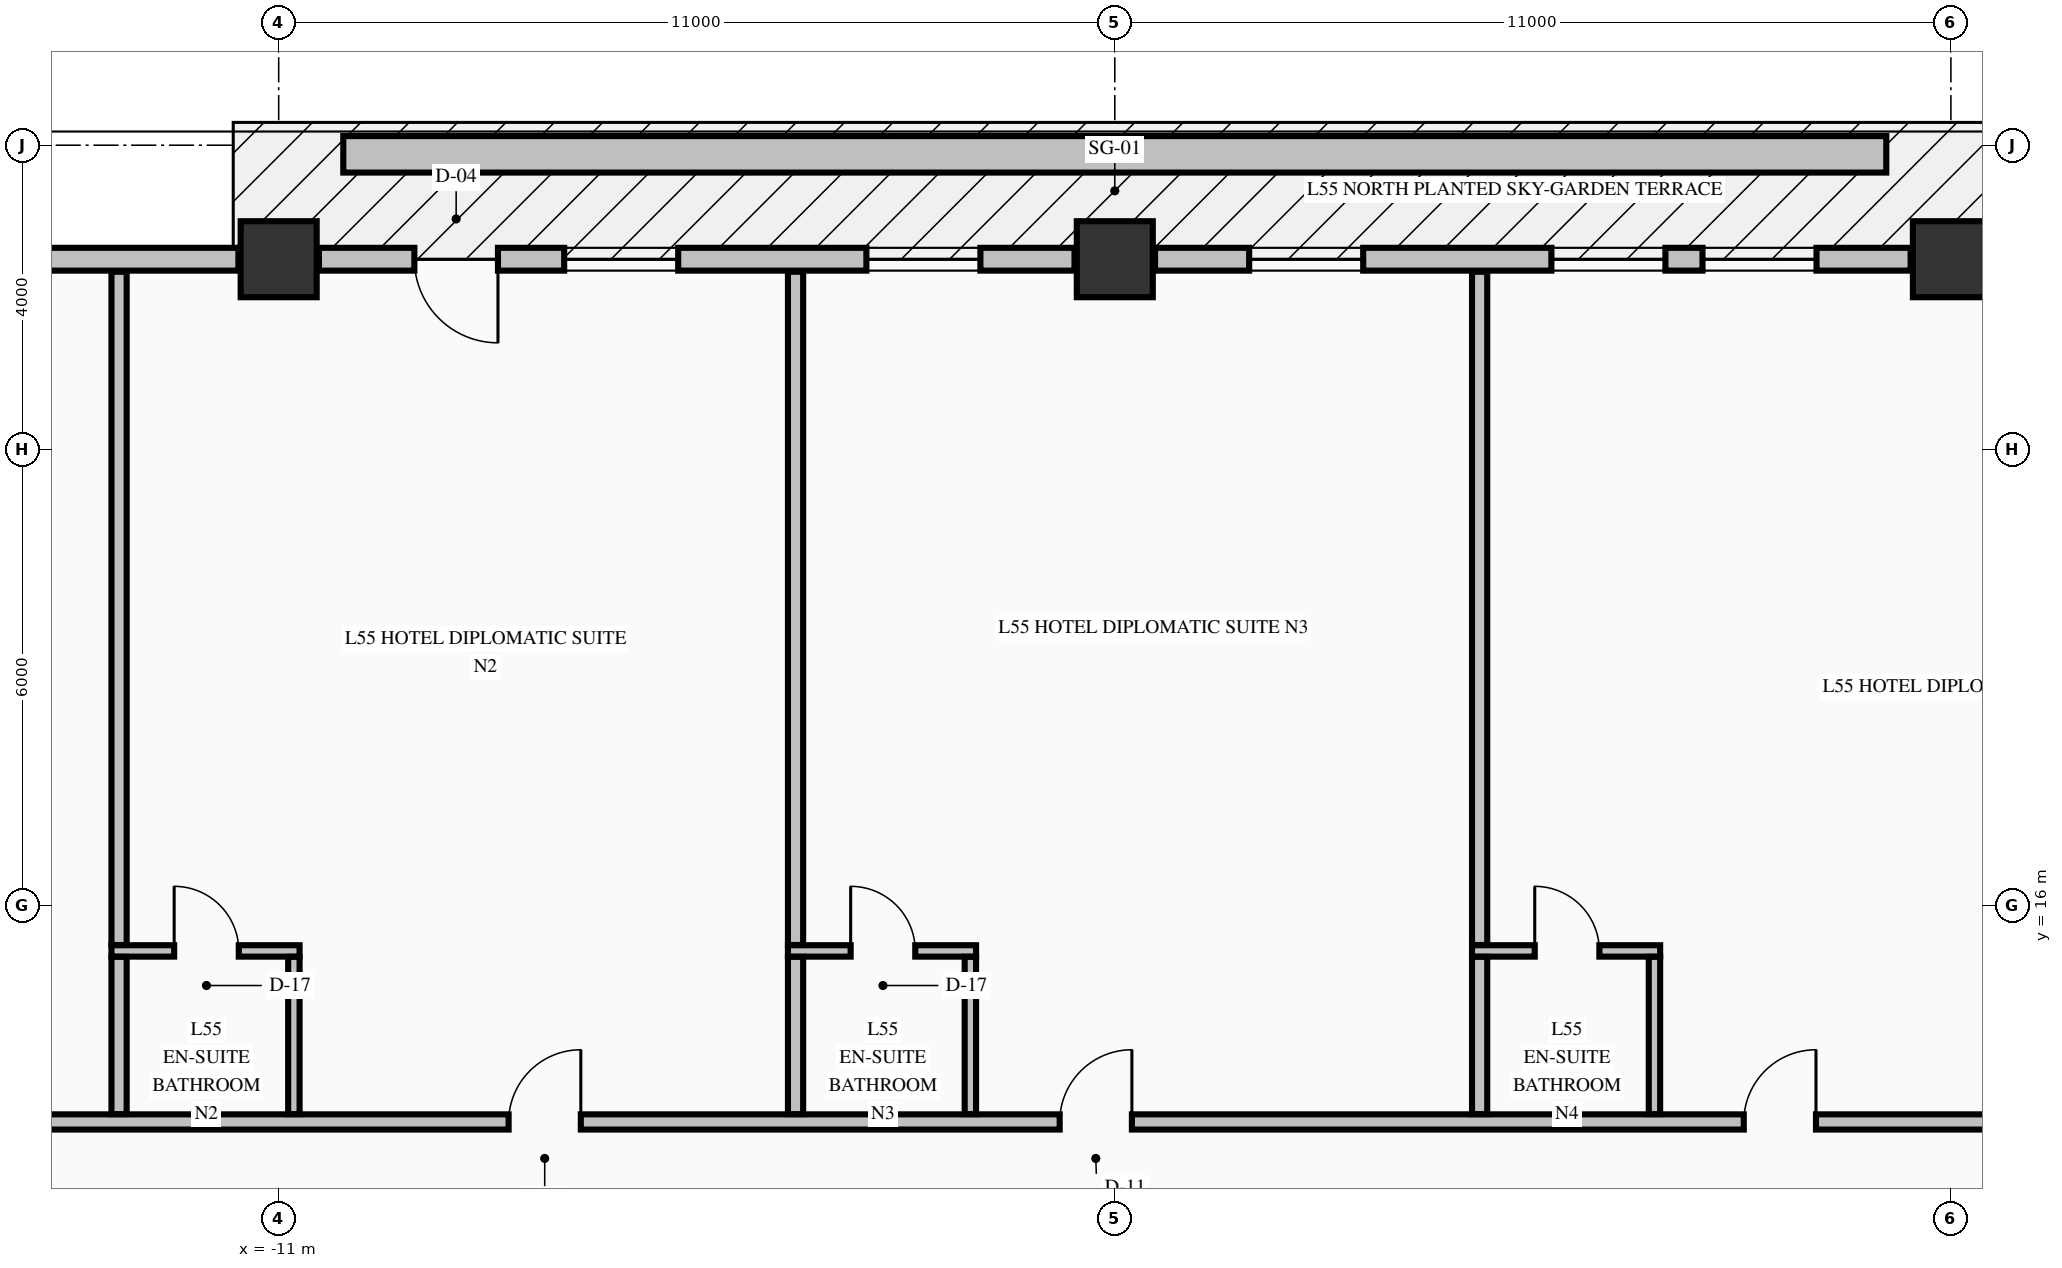
"""IFC4 building model, lengths in metres.
Left out: names, types, materials, properties, quantities, classifications, styles, units other than length and angle.
Written with IfcOpenShell. Run it as: python <this file> out.ifc"""

import sys

from ifc_helpers import new_model, si_unit, direction, frame, frame_2d, origin, origin_2d, place, context, subcontext, project, spatial, rectangle, extrude, element, fill, save


model = new_model("IFC4")
c1 = context("Model", 3, precision=1e-05, world=origin(), true_north=direction((0.0, 1.0)))
c2 = subcontext(c1, "Body", "Model", "MODEL_VIEW")
j1 = project(units=[si_unit("LENGTHUNIT", "METRE"), si_unit("PLANEANGLEUNIT", "RADIAN")], contexts=[c1])
p1 = place(None, origin())
s1 = spatial("IfcSite", under=j1, at=p1, CompositionType="ELEMENT")
p2 = place(p1, origin())
s2 = spatial("IfcBuilding", under=s1, at=p2, CompositionType="ELEMENT")
p3 = place(p2, frame((0.0, 0.0, 211.86)))
s3 = spatial("IfcBuildingStorey", under=s2, at=p3, CompositionType="ELEMENT", Elevation=211.86)
for number, where, z_axis, x_axis in (
    (1, (-11.0, 24.5, -0.325), (0.0, 0.0, 1.0), (1.0, 0.0, 0.0)),
    (2, (0.0, 24.5, -0.325), (0.0, 0.0, 1.0), (1.0, 0.0, 0.0)),
    (3, (11.0, 24.5, -0.325), (0.0, 0.0, 1.0), (1.0, 0.0, 0.0)),
):
    element("IfcColumn", number, at=place(p3, frame(where, z_axis=z_axis, x_axis=x_axis)), inside=s3, PredefinedType="COLUMN", context=c2, shape_type="SweptSolid", body=[
        extrude(rectangle(XDim=1.0, YDim=1.0, at=origin_2d()), origin(), (0.0, 0.0, 1.0), 3.475),
    ])
p4 = place(p3, frame((-11.53, 24.5, 0.0), z_axis=(0.0, 0.0, 1.0), x_axis=(-1.0, 0.0, 0.0)))
e4 = element("IfcWall", 4, at=p4, inside=s3, PredefinedType="STANDARD", context=c2, shape_type="SweptSolid", body=[
    extrude(rectangle(XDim=9.94, YDim=0.3, at=frame_2d((4.97, 0.0))), origin(), (0.0, 0.0, 1.0), 2.542),
])
p5 = place(p4, frame((3.226, 0.0, 0.72)))
e5 = element("IfcOpeningElement", 5, at=p5, cuts=e4, PredefinedType="OPENING", context=c2, shape_type="SweptSolid", body=[
    extrude(rectangle(XDim=1.5, YDim=1.6, at=frame_2d((0.75, 0.8))), frame((0.0, 0.16, 0.0), z_axis=(0.0, -1.0, 0.0), x_axis=(1.0, 0.0, 0.0)), (0.0, 0.0, 1.0), 0.32),
])
p6 = place(p4, frame((5.214, 0.0, 0.72)))
e6 = element("IfcOpeningElement", 6, at=p6, cuts=e4, PredefinedType="OPENING", context=c2, shape_type="SweptSolid", body=[
    extrude(rectangle(XDim=1.5, YDim=1.6, at=frame_2d((0.75, 0.8))), frame((0.0, 0.16, 0.0), z_axis=(0.0, -1.0, 0.0), x_axis=(1.0, 0.0, 0.0)), (0.0, 0.0, 1.0), 0.32),
])
p7 = place(p3, frame((-0.53, 24.5, 0.0), z_axis=(0.0, 0.0, 1.0), x_axis=(-1.0, 0.0, 0.0)))
e7 = element("IfcWall", 7, at=p7, inside=s3, PredefinedType="STANDARD", context=c2, shape_type="SweptSolid", body=[
    extrude(rectangle(XDim=9.94, YDim=0.3, at=frame_2d((4.97, 0.0))), origin(), (0.0, 0.0, 1.0), 2.542),
])
p8 = place(p7, frame((7.585, 0.0, 0.0)))
e8 = element("IfcOpeningElement", 8, at=p8, cuts=e7, PredefinedType="OPENING", context=c2, shape_type="SweptSolid", body=[
    extrude(rectangle(XDim=1.1, YDim=2.15, at=frame_2d((0.55, 1.075))), frame((0.0, 0.16, 0.0), z_axis=(0.0, -1.0, 0.0), x_axis=(1.0, 0.0, 0.0)), (0.0, 0.0, 1.0), 0.32),
])
p9 = place(p7, frame((1.238, 0.0, 0.72)))
e9 = element("IfcOpeningElement", 9, at=p9, cuts=e7, PredefinedType="OPENING", context=c2, shape_type="SweptSolid", body=[
    extrude(rectangle(XDim=1.5, YDim=1.6, at=frame_2d((0.75, 0.8))), frame((0.0, 0.16, 0.0), z_axis=(0.0, -1.0, 0.0), x_axis=(1.0, 0.0, 0.0)), (0.0, 0.0, 1.0), 0.32),
])
p10 = place(p7, frame((5.214, 0.0, 0.72)))
e10 = element("IfcOpeningElement", 10, at=p10, cuts=e7, PredefinedType="OPENING", context=c2, shape_type="SweptSolid", body=[
    extrude(rectangle(XDim=1.5, YDim=1.6, at=frame_2d((0.75, 0.8))), frame((0.0, 0.16, 0.0), z_axis=(0.0, -1.0, 0.0), x_axis=(1.0, 0.0, 0.0)), (0.0, 0.0, 1.0), 0.32),
])
p11 = place(p3, frame((10.47, 24.5, 0.0), z_axis=(0.0, 0.0, 1.0), x_axis=(-1.0, 0.0, 0.0)))
e11 = element("IfcWall", 11, at=p11, inside=s3, PredefinedType="STANDARD", context=c2, shape_type="SweptSolid", body=[
    extrude(rectangle(XDim=9.94, YDim=0.3, at=frame_2d((4.97, 0.0))), origin(), (0.0, 0.0, 1.0), 2.542),
])
p12 = place(p11, frame((1.238, 0.0, 0.72)))
e12 = element("IfcOpeningElement", 12, at=p12, cuts=e11, PredefinedType="OPENING", context=c2, shape_type="SweptSolid", body=[
    extrude(rectangle(XDim=1.5, YDim=1.6, at=frame_2d((0.75, 0.8))), frame((0.0, 0.16, 0.0), z_axis=(0.0, -1.0, 0.0), x_axis=(1.0, 0.0, 0.0)), (0.0, 0.0, 1.0), 0.32),
])
p13 = place(p11, frame((3.226, 0.0, 0.72)))
e13 = element("IfcOpeningElement", 13, at=p13, cuts=e11, PredefinedType="OPENING", context=c2, shape_type="SweptSolid", body=[
    extrude(rectangle(XDim=1.5, YDim=1.6, at=frame_2d((0.75, 0.8))), frame((0.0, 0.16, 0.0), z_axis=(0.0, -1.0, 0.0), x_axis=(1.0, 0.0, 0.0)), (0.0, 0.0, 1.0), 0.32),
])
p14 = place(p11, frame((7.202, 0.0, 0.72)))
e14 = element("IfcOpeningElement", 14, at=p14, cuts=e11, PredefinedType="OPENING", context=c2, shape_type="SweptSolid", body=[
    extrude(rectangle(XDim=1.5, YDim=1.6, at=frame_2d((0.75, 0.8))), frame((0.0, 0.16, 0.0), z_axis=(0.0, -1.0, 0.0), x_axis=(1.0, 0.0, 0.0)), (0.0, 0.0, 1.0), 0.32),
])
p15 = place(p3, frame((-22.1, 13.15, 0.0), z_axis=(0.0, 0.0, 1.0), x_axis=(1.0, 0.0, 0.0)))
e15 = element("IfcWall", 15, at=p15, inside=s3, PredefinedType="PARTITIONING", context=c2, shape_type="SweptSolid", body=[
    extrude(rectangle(XDim=39.2, YDim=0.2, at=frame_2d((19.6, 0.0))), origin(), (0.0, 0.0, 1.0), 3.15),
])
p16 = place(p15, frame((5.125, 0.0, 0.0)))
e16 = element("IfcOpeningElement", 16, at=p16, cuts=e15, PredefinedType="OPENING", context=c2, shape_type="SweptSolid", body=[
    extrude(rectangle(XDim=1.05, YDim=2.15, at=frame_2d((0.525, 1.075))), frame((0.0, 0.11, 0.0), z_axis=(0.0, -1.0, 0.0), x_axis=(1.0, 0.0, 0.0)), (0.0, 0.0, 1.0), 0.22),
])
p17 = place(p15, frame((14.125, 0.0, 0.0)))
e17 = element("IfcOpeningElement", 17, at=p17, cuts=e15, PredefinedType="OPENING", context=c2, shape_type="SweptSolid", body=[
    extrude(rectangle(XDim=0.95, YDim=2.15, at=frame_2d((0.475, 1.075))), frame((0.0, 0.11, 0.0), z_axis=(0.0, -1.0, 0.0), x_axis=(1.0, 0.0, 0.0)), (0.0, 0.0, 1.0), 0.22),
])
p18 = place(p15, frame((21.375, 0.0, 0.0)))
e18 = element("IfcOpeningElement", 18, at=p18, cuts=e15, PredefinedType="OPENING", context=c2, shape_type="SweptSolid", body=[
    extrude(rectangle(XDim=0.95, YDim=2.15, at=frame_2d((0.475, 1.075))), frame((0.0, 0.11, 0.0), z_axis=(0.0, -1.0, 0.0), x_axis=(1.0, 0.0, 0.0)), (0.0, 0.0, 1.0), 0.22),
])
p19 = place(p15, frame((30.375, 0.0, 0.0)))
e19 = element("IfcOpeningElement", 19, at=p19, cuts=e15, PredefinedType="OPENING", context=c2, shape_type="SweptSolid", body=[
    extrude(rectangle(XDim=0.95, YDim=2.15, at=frame_2d((0.475, 1.075))), frame((0.0, 0.11, 0.0), z_axis=(0.0, -1.0, 0.0), x_axis=(1.0, 0.0, 0.0)), (0.0, 0.0, 1.0), 0.22),
])
p20 = place(p3, frame((-13.2, 15.4, 0.0), z_axis=(0.0, 0.0, 1.0), x_axis=(1.0, 0.0, 0.0)))
e20 = element("IfcWall", 20, at=p20, inside=s3, PredefinedType="PARTITIONING", context=c2, shape_type="SweptSolid", body=[
    extrude(rectangle(XDim=2.475, YDim=0.15, at=frame_2d((1.237, 0.0))), origin(), (0.0, 0.0, 1.0), 3.15),
])
p21 = place(p20, frame((0.825, 0.0, 0.0)))
e21 = element("IfcOpeningElement", 21, at=p21, cuts=e20, PredefinedType="OPENING", context=c2, shape_type="SweptSolid", body=[
    extrude(rectangle(XDim=0.85, YDim=2.1, at=frame_2d((0.425, 1.05))), frame((0.0, 0.085, 0.0), z_axis=(0.0, -1.0, 0.0), x_axis=(1.0, 0.0, 0.0)), (0.0, 0.0, 1.0), 0.17),
])
p22 = place(p3, frame((-4.3, 15.4, 0.0), z_axis=(0.0, 0.0, 1.0), x_axis=(1.0, 0.0, 0.0)))
e22 = element("IfcWall", 22, at=p22, inside=s3, PredefinedType="PARTITIONING", context=c2, shape_type="SweptSolid", body=[
    extrude(rectangle(XDim=2.475, YDim=0.15, at=frame_2d((1.238, 0.0))), origin(), (0.0, 0.0, 1.0), 3.15),
])
p23 = place(p22, frame((0.825, 0.0, 0.0)))
e23 = element("IfcOpeningElement", 23, at=p23, cuts=e22, PredefinedType="OPENING", context=c2, shape_type="SweptSolid", body=[
    extrude(rectangle(XDim=0.85, YDim=2.1, at=frame_2d((0.425, 1.05))), frame((0.0, 0.085, 0.0), z_axis=(0.0, -1.0, 0.0), x_axis=(1.0, 0.0, 0.0)), (0.0, 0.0, 1.0), 0.17),
])
p24 = place(p3, frame((4.7, 15.4, 0.0), z_axis=(0.0, 0.0, 1.0), x_axis=(1.0, 0.0, 0.0)))
e24 = element("IfcWall", 24, at=p24, inside=s3, PredefinedType="PARTITIONING", context=c2, shape_type="SweptSolid", body=[
    extrude(rectangle(XDim=2.475, YDim=0.15, at=frame_2d((1.238, 0.0))), origin(), (0.0, 0.0, 1.0), 3.15),
])
p25 = place(p24, frame((0.825, 0.0, 0.0)))
e25 = element("IfcOpeningElement", 25, at=p25, cuts=e24, PredefinedType="OPENING", context=c2, shape_type="SweptSolid", body=[
    extrude(rectangle(XDim=0.85, YDim=2.1, at=frame_2d((0.425, 1.05))), frame((0.0, 0.085, 0.0), z_axis=(0.0, -1.0, 0.0), x_axis=(1.0, 0.0, 0.0)), (0.0, 0.0, 1.0), 0.17),
])
p26 = place(p3, frame((-13.1, 13.253, 0.0), z_axis=(0.0, 0.0, 1.0), x_axis=(0.0, 1.0, 0.0)))
e26 = element("IfcWall", 26, at=p26, inside=s3, PredefinedType="PARTITIONING", context=c2, shape_type="SweptSolid", body=[
    extrude(rectangle(XDim=2.069, YDim=0.2, at=frame_2d((1.035, 0.0))), origin(), (0.0, 0.0, 1.0), 3.15),
])
p27 = place(p3, frame((-13.1, 15.478, 0.0), z_axis=(0.0, 0.0, 1.0), x_axis=(0.0, 1.0, 0.0)))
e27 = element("IfcWall", 27, at=p27, inside=s3, PredefinedType="PARTITIONING", context=c2, shape_type="SweptSolid", body=[
    extrude(rectangle(XDim=8.857, YDim=0.2, at=frame_2d((4.428, 0.0))), origin(), (0.0, 0.0, 1.0), 3.15),
])
p28 = place(p3, frame((-10.8, 13.253, 0.0), z_axis=(0.0, 0.0, 1.0), x_axis=(0.0, 1.0, 0.0)))
e28 = element("IfcWall", 28, at=p28, inside=s3, PredefinedType="PARTITIONING", context=c2, shape_type="SweptSolid", body=[
    extrude(rectangle(XDim=2.069, YDim=0.15, at=frame_2d((1.035, 0.0))), origin(), (0.0, 0.0, 1.0), 2.342),
])
p29 = place(p3, frame((-4.2, 13.253, 0.0), z_axis=(0.0, 0.0, 1.0), x_axis=(0.0, 1.0, 0.0)))
e29 = element("IfcWall", 29, at=p29, inside=s3, PredefinedType="PARTITIONING", context=c2, shape_type="SweptSolid", body=[
    extrude(rectangle(XDim=2.069, YDim=0.2, at=frame_2d((1.035, 0.0))), origin(), (0.0, 0.0, 1.0), 3.15),
])
p30 = place(p3, frame((-4.2, 15.478, 0.0), z_axis=(0.0, 0.0, 1.0), x_axis=(0.0, 1.0, 0.0)))
e30 = element("IfcWall", 30, at=p30, inside=s3, PredefinedType="PARTITIONING", context=c2, shape_type="SweptSolid", body=[
    extrude(rectangle(XDim=8.857, YDim=0.2, at=frame_2d((4.428, 0.0))), origin(), (0.0, 0.0, 1.0), 3.15),
])
p31 = place(p3, frame((-1.9, 13.253, 0.0), z_axis=(0.0, 0.0, 1.0), x_axis=(0.0, 1.0, 0.0)))
e31 = element("IfcWall", 31, at=p31, inside=s3, PredefinedType="PARTITIONING", context=c2, shape_type="SweptSolid", body=[
    extrude(rectangle(XDim=2.069, YDim=0.15, at=frame_2d((1.035, 0.0))), origin(), (0.0, 0.0, 1.0), 3.15),
])
p32 = place(p3, frame((4.8, 13.253, 0.0), z_axis=(0.0, 0.0, 1.0), x_axis=(0.0, 1.0, 0.0)))
e32 = element("IfcWall", 32, at=p32, inside=s3, PredefinedType="PARTITIONING", context=c2, shape_type="SweptSolid", body=[
    extrude(rectangle(XDim=2.069, YDim=0.2, at=frame_2d((1.035, 0.0))), origin(), (0.0, 0.0, 1.0), 3.15),
])
p33 = place(p3, frame((4.8, 15.478, 0.0), z_axis=(0.0, 0.0, 1.0), x_axis=(0.0, 1.0, 0.0)))
e33 = element("IfcWall", 33, at=p33, inside=s3, PredefinedType="PARTITIONING", context=c2, shape_type="SweptSolid", body=[
    extrude(rectangle(XDim=8.857, YDim=0.2, at=frame_2d((4.428, 0.0))), origin(), (0.0, 0.0, 1.0), 3.15),
])
p34 = place(p3, frame((7.1, 13.253, 0.0), z_axis=(0.0, 0.0, 1.0), x_axis=(0.0, 1.0, 0.0)))
e34 = element("IfcWall", 34, at=p34, inside=s3, PredefinedType="PARTITIONING", context=c2, shape_type="SweptSolid", body=[
    extrude(rectangle(XDim=2.069, YDim=0.15, at=frame_2d((1.035, 0.0))), origin(), (0.0, 0.0, 1.0), 3.15),
])
p35 = place(p3, frame((-10.15, 25.88, -0.04), z_axis=(0.0, 0.0, 1.0), x_axis=(1.0, 0.0, 0.0)))
e35 = element("IfcWall", 35, at=p35, inside=s3, PredefinedType="PARAPET", context=c2, shape_type="SweptSolid", body=[
    extrude(rectangle(XDim=20.3, YDim=0.48, at=frame_2d((10.15, 0.0))), origin(), (0.0, 0.0, 1.0), 0.52),
])
p36 = place(p8, origin())
e36 = element("IfcDoor", 36, at=p36, inside=s3, OperationType="SINGLE_SWING_LEFT", PredefinedType="DOOR", context=c2, shape_type="SweptSolid", body=[
    extrude(rectangle(XDim=1.1, YDim=2.15, at=frame_2d((0.55, 1.075))), frame((0.0, 0.025, 0.0), z_axis=(0.0, -1.0, 0.0), x_axis=(1.0, 0.0, 0.0)), (0.0, 0.0, 1.0), 0.05),
])
fill(e8, e36)
p37 = place(p9, origin())
e37 = element("IfcWindow", 37, at=p37, inside=s3, PartitioningType="SINGLE_PANEL", PredefinedType="WINDOW", context=c2, shape_type="SweptSolid", body=[
    extrude(rectangle(XDim=1.5, YDim=1.6, at=frame_2d((0.75, 0.8))), frame((0.0, 0.03, 0.0), z_axis=(0.0, -1.0, 0.0), x_axis=(1.0, 0.0, 0.0)), (0.0, 0.0, 1.0), 0.06),
])
fill(e9, e37)
p38 = place(p10, origin())
e38 = element("IfcWindow", 38, at=p38, inside=s3, PartitioningType="SINGLE_PANEL", PredefinedType="WINDOW", context=c2, shape_type="SweptSolid", body=[
    extrude(rectangle(XDim=1.5, YDim=1.6, at=frame_2d((0.75, 0.8))), frame((0.0, 0.03, 0.0), z_axis=(0.0, -1.0, 0.0), x_axis=(1.0, 0.0, 0.0)), (0.0, 0.0, 1.0), 0.06),
])
fill(e10, e38)
p39 = place(p12, origin())
e39 = element("IfcWindow", 39, at=p39, inside=s3, PartitioningType="SINGLE_PANEL", PredefinedType="WINDOW", context=c2, shape_type="SweptSolid", body=[
    extrude(rectangle(XDim=1.5, YDim=1.6, at=frame_2d((0.75, 0.8))), frame((0.0, 0.03, 0.0), z_axis=(0.0, -1.0, 0.0), x_axis=(1.0, 0.0, 0.0)), (0.0, 0.0, 1.0), 0.06),
])
fill(e12, e39)
p40 = place(p13, origin())
e40 = element("IfcWindow", 40, at=p40, inside=s3, PartitioningType="SINGLE_PANEL", PredefinedType="WINDOW", context=c2, shape_type="SweptSolid", body=[
    extrude(rectangle(XDim=1.5, YDim=1.6, at=frame_2d((0.75, 0.8))), frame((0.0, 0.03, 0.0), z_axis=(0.0, -1.0, 0.0), x_axis=(1.0, 0.0, 0.0)), (0.0, 0.0, 1.0), 0.06),
])
fill(e13, e40)
p41 = place(p14, origin())
e41 = element("IfcWindow", 41, at=p41, inside=s3, PartitioningType="SINGLE_PANEL", PredefinedType="WINDOW", context=c2, shape_type="SweptSolid", body=[
    extrude(rectangle(XDim=1.5, YDim=1.6, at=frame_2d((0.75, 0.8))), frame((0.0, 0.03, 0.0), z_axis=(0.0, -1.0, 0.0), x_axis=(1.0, 0.0, 0.0)), (0.0, 0.0, 1.0), 0.06),
])
fill(e14, e41)
p42 = place(p17, origin())
e42 = element("IfcDoor", 42, at=p42, inside=s3, OperationType="SINGLE_SWING_RIGHT", PredefinedType="DOOR", context=c2, shape_type="SweptSolid", body=[
    extrude(rectangle(XDim=0.95, YDim=2.15, at=frame_2d((0.475, 1.075))), frame((0.0, 0.025, 0.0), z_axis=(0.0, -1.0, 0.0), x_axis=(1.0, 0.0, 0.0)), (0.0, 0.0, 1.0), 0.05),
])
fill(e17, e42)
p43 = place(p21, origin())
e43 = element("IfcDoor", 43, at=p43, inside=s3, OperationType="SINGLE_SWING_LEFT", PredefinedType="DOOR", context=c2, shape_type="SweptSolid", body=[
    extrude(rectangle(XDim=0.85, YDim=2.1, at=frame_2d((0.425, 1.05))), frame((0.0, 0.025, 0.0), z_axis=(0.0, -1.0, 0.0), x_axis=(1.0, 0.0, 0.0)), (0.0, 0.0, 1.0), 0.05),
])
fill(e21, e43)
p44 = place(p18, origin())
e44 = element("IfcDoor", 44, at=p44, inside=s3, OperationType="SINGLE_SWING_RIGHT", PredefinedType="DOOR", context=c2, shape_type="SweptSolid", body=[
    extrude(rectangle(XDim=0.95, YDim=2.15, at=frame_2d((0.475, 1.075))), frame((0.0, 0.025, 0.0), z_axis=(0.0, -1.0, 0.0), x_axis=(1.0, 0.0, 0.0)), (0.0, 0.0, 1.0), 0.05),
])
fill(e18, e44)
p45 = place(p23, origin())
e45 = element("IfcDoor", 45, at=p45, inside=s3, OperationType="SINGLE_SWING_LEFT", PredefinedType="DOOR", context=c2, shape_type="SweptSolid", body=[
    extrude(rectangle(XDim=0.85, YDim=2.1, at=frame_2d((0.425, 1.05))), frame((0.0, 0.025, 0.0), z_axis=(0.0, -1.0, 0.0), x_axis=(1.0, 0.0, 0.0)), (0.0, 0.0, 1.0), 0.05),
])
fill(e23, e45)
p46 = place(p19, origin())
e46 = element("IfcDoor", 46, at=p46, inside=s3, OperationType="SINGLE_SWING_RIGHT", PredefinedType="DOOR", context=c2, shape_type="SweptSolid", body=[
    extrude(rectangle(XDim=0.95, YDim=2.15, at=frame_2d((0.475, 1.075))), frame((0.0, 0.025, 0.0), z_axis=(0.0, -1.0, 0.0), x_axis=(1.0, 0.0, 0.0)), (0.0, 0.0, 1.0), 0.05),
])
fill(e19, e46)
p47 = place(p25, origin())
e47 = element("IfcDoor", 47, at=p47, inside=s3, OperationType="SINGLE_SWING_LEFT", PredefinedType="DOOR", context=c2, shape_type="SweptSolid", body=[
    extrude(rectangle(XDim=0.85, YDim=2.1, at=frame_2d((0.425, 1.05))), frame((0.0, 0.025, 0.0), z_axis=(0.0, -1.0, 0.0), x_axis=(1.0, 0.0, 0.0)), (0.0, 0.0, 1.0), 0.05),
])
fill(e25, e47)
save(model, sys.argv[1])
